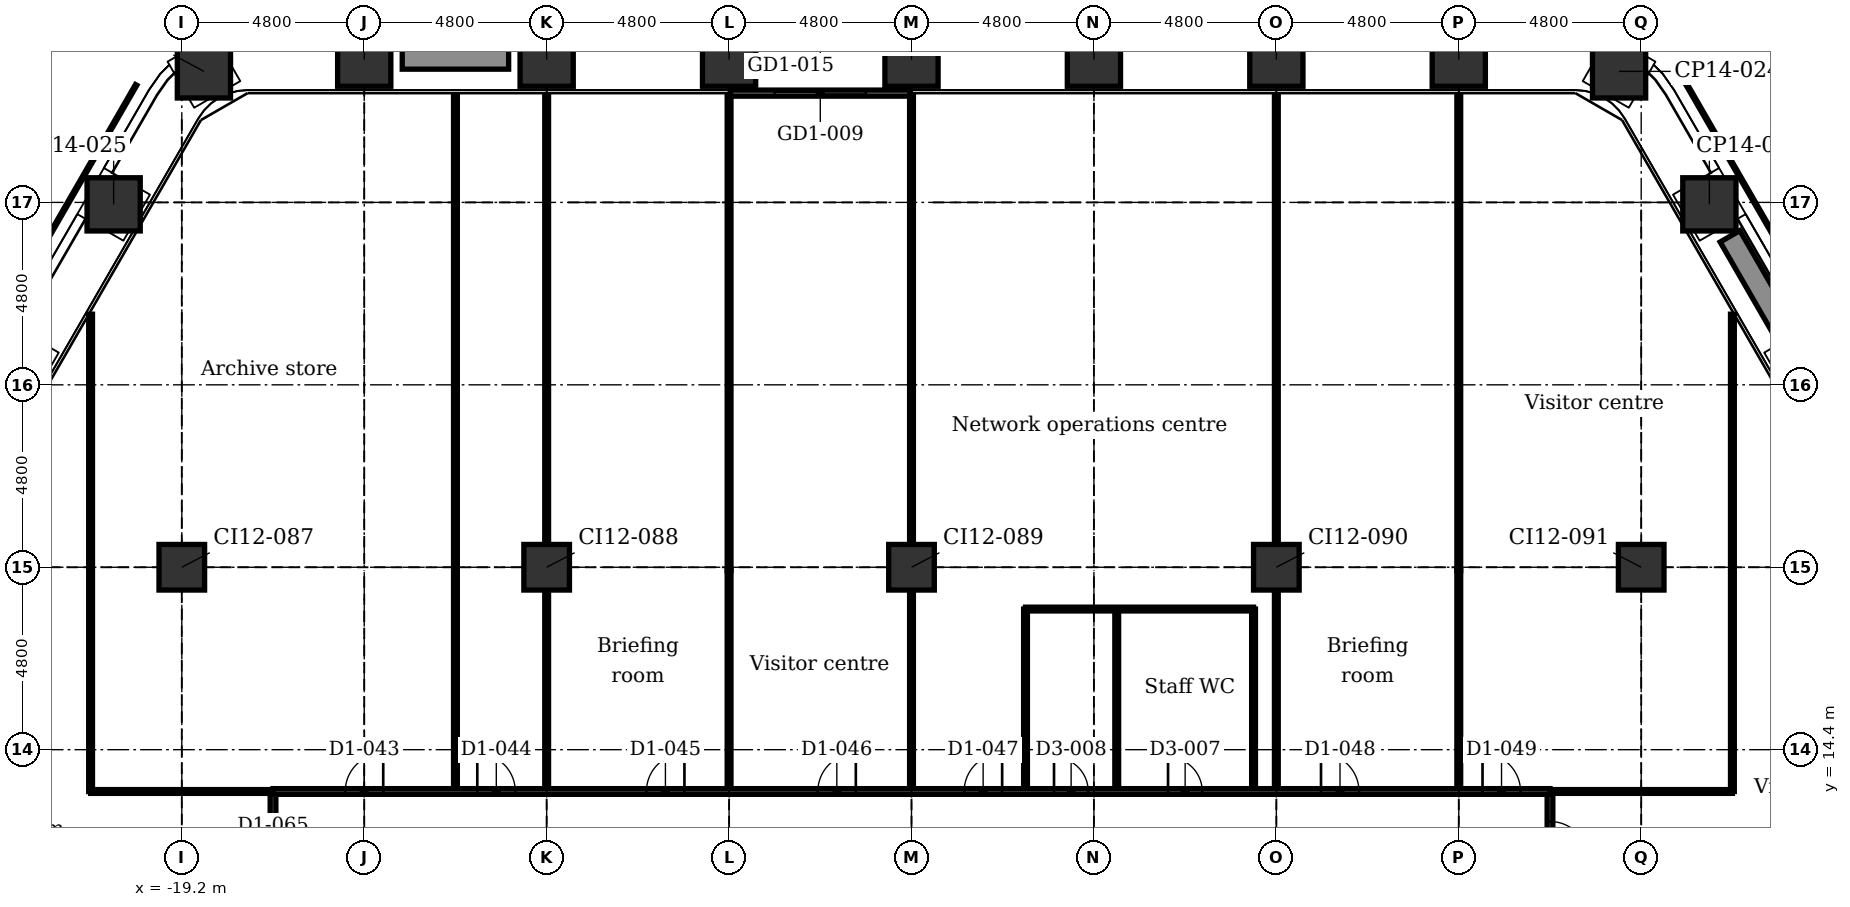
"""IFC4 building model, lengths in metres.
Left out: names, types, materials, properties, quantities, classifications, styles, units other than length and angle.
Written with IfcOpenShell. Run it as: python <this file> out.ifc"""

import sys

from ifc_helpers import new_model, si_unit, direction, frame, frame_2d, origin, origin_2d, place, context, subcontext, project, spatial, rectangle, extrude, element, fill, save


model = new_model("IFC4")
c1 = context("Model", 3, precision=1e-05, world=origin(), true_north=direction((0.0, 1.0)))
c2 = subcontext(c1, "Body", "Model", "MODEL_VIEW")
j1 = project(units=[si_unit("LENGTHUNIT", "METRE"), si_unit("PLANEANGLEUNIT", "RADIAN")], contexts=[c1])
p1 = place(None, origin())
s1 = spatial("IfcSite", under=j1, at=p1, CompositionType="ELEMENT")
p2 = place(p1, origin())
s2 = spatial("IfcBuilding", under=s1, at=p2, CompositionType="ELEMENT")
p3 = place(p2, frame((0.0, 0.0, 17.4)))
s3 = spatial("IfcBuildingStorey", under=s2, at=p3, CompositionType="ELEMENT", Elevation=17.4)
for number, where, z_axis, x_axis in (
    (1, (-18.618, 32.247, -0.25), (0.0, 0.0, 1.0), (0.866, 0.5, 0.0)),
    (2, (-14.4, 32.555, -0.25), (0.0, 0.0, 1.0), (1.0, 0.0, 0.0)),
    (3, (-9.6, 32.555, -0.25), (0.0, 0.0, 1.0), (1.0, 0.0, 0.0)),
    (4, (-4.8, 32.555, -0.25), (0.0, 0.0, 1.0), (1.0, 0.0, 0.0)),
    (5, (0.0, 32.555, -0.25), (0.0, 0.0, 1.0), (1.0, 0.0, 0.0)),
    (6, (4.8, 32.555, -0.25), (0.0, 0.0, 1.0), (1.0, 0.0, 0.0)),
    (7, (9.6, 32.555, -0.25), (0.0, 0.0, 1.0), (1.0, 0.0, 0.0)),
    (8, (14.4, 32.555, -0.25), (0.0, 0.0, 1.0), (1.0, 0.0, 0.0)),
    (9, (18.618, 32.247, -0.25), (0.0, 0.0, 1.0), (0.5, 0.866, 0.0)),
    (10, (20.994, 28.749, -0.25), (0.0, 0.0, 1.0), (0.866, 0.5, 0.0)),
    (11, (23.394, 24.592, -0.25), (0.0, 0.0, 1.0), (0.866, 0.5, 0.0)),
    (12, (-23.394, 24.592, -0.25), (0.0, 0.0, 1.0), (0.5, 0.866, 0.0)),
    (13, (-20.994, 28.749, -0.25), (0.0, 0.0, 1.0), (0.5, 0.866, 0.0)),
):
    element("IfcColumn", number, at=place(p3, frame(where, z_axis=z_axis, x_axis=x_axis)), inside=s3, PredefinedType="COLUMN", context=c2, shape_type="SweptSolid", body=[
        extrude(rectangle(XDim=1.4, YDim=1.4, at=origin_2d()), origin(), (0.0, 0.0, 1.0), 5.0),
    ])
for number, where, z_axis, x_axis in (
    (14, (-19.2, 19.2, -0.25), (0.0, 0.0, 1.0), (1.0, 0.0, 0.0)),
    (15, (-9.6, 19.2, -0.25), (0.0, 0.0, 1.0), (1.0, 0.0, 0.0)),
    (16, (0.0, 19.2, -0.25), (0.0, 0.0, 1.0), (1.0, 0.0, 0.0)),
    (17, (9.6, 19.2, -0.25), (0.0, 0.0, 1.0), (1.0, 0.0, 0.0)),
    (18, (19.2, 19.2, -0.25), (0.0, 0.0, 1.0), (1.0, 0.0, 0.0)),
):
    element("IfcColumn", number, at=place(p3, frame(where, z_axis=z_axis, x_axis=x_axis)), inside=s3, PredefinedType="COLUMN", context=c2, shape_type="SweptSolid", body=[
        extrude(rectangle(XDim=1.2, YDim=1.2, at=origin_2d()), origin(), (0.0, 0.0, 1.0), 5.0),
    ])
p4 = place(p3, frame((-4.77, 31.675, 0.0), z_axis=(0.0, 0.0, 1.0), x_axis=(1.0, 0.0, 0.0)))
e19 = element("IfcWall", 19, at=p4, inside=s3, PredefinedType="PARTITIONING", context=c2, shape_type="SweptSolid", body=[
    extrude(rectangle(XDim=4.74, YDim=0.16, at=frame_2d((2.37, 0.0))), origin(), (0.0, 0.0, 1.0), 4.75),
])
p5 = place(p4, frame((1.17, 0.0, 0.0)))
e20 = element("IfcOpeningElement", 20, at=p5, cuts=e19, PredefinedType="OPENING", context=c2, shape_type="SweptSolid", body=[
    extrude(rectangle(XDim=2.4, YDim=2.4, at=frame_2d((1.2, 1.2))), frame((0.0, 0.09, 0.0), z_axis=(0.0, -1.0, 0.0), x_axis=(1.0, 0.0, 0.0)), (0.0, 0.0, 1.0), 0.18),
])
for number, where, z_axis, x_axis in (
    (21, (-13.4, 32.605, 0.0), (0.0, 0.0, 1.0), (1.0, 0.0, 0.0)),
    (22, (21.537, 27.907, 0.0), (0.0, 0.0, 1.0), (0.5, -0.866, 0.0)),
):
    element("IfcWall", number, at=place(p3, frame(where, z_axis=z_axis, x_axis=x_axis)), inside=s3, PredefinedType="USERDEFINED", context=c2, shape_type="SweptSolid", body=[
        extrude(rectangle(XDim=2.8, YDim=0.6, at=frame_2d((1.4, 0.0))), origin(), (0.0, 0.0, 1.0), 0.7),
    ])
p6 = place(p3, frame((21.6, 13.3, 0.0), z_axis=(0.0, 0.0, 1.0), x_axis=(0.0, 1.0, 0.0)))
e23 = element("IfcWall", 23, at=p6, inside=s3, PredefinedType="PARTITIONING", context=c2, shape_type="SweptSolid", body=[
    extrude(rectangle(XDim=12.558, YDim=0.1, at=frame_2d((6.279, 0.0))), origin(), (0.0, 0.0, 1.0), 4.75),
])
p7 = place(p3, frame((16.8, 3.95, 0.0), z_axis=(0.0, 0.0, 1.0), x_axis=(0.0, 1.0, 0.0)))
e24 = element("IfcWall", 24, at=p7, inside=s3, PredefinedType="PARTITIONING", context=c2, shape_type="SweptSolid", body=[
    extrude(rectangle(XDim=9.35, YDim=0.15, at=frame_2d((4.675, 0.0))), origin(), (0.0, 0.0, 1.0), 4.75),
])
p8 = place(p7, frame((2.835, 0.0, 0.0)))
e25 = element("IfcOpeningElement", 25, at=p8, cuts=e24, PredefinedType="OPENING", context=c2, shape_type="SweptSolid", body=[
    extrude(rectangle(XDim=1.0, YDim=2.1, at=frame_2d((0.5, 1.05))), frame((0.0, 0.085, 0.0), z_axis=(0.0, -1.0, 0.0), x_axis=(1.0, 0.0, 0.0)), (0.0, 0.0, 1.0), 0.17),
])
p9 = place(p7, frame((7.56, 0.0, 0.0)))
e26 = element("IfcOpeningElement", 26, at=p9, cuts=e24, PredefinedType="OPENING", context=c2, shape_type="SweptSolid", body=[
    extrude(rectangle(XDim=1.0, YDim=2.1, at=frame_2d((0.5, 1.05))), frame((0.0, 0.085, 0.0), z_axis=(0.0, -1.0, 0.0), x_axis=(1.0, 0.0, 0.0)), (0.0, 0.0, 1.0), 0.17),
])
p10 = place(p3, frame((14.4, 19.113, 0.0), z_axis=(0.0, 0.0, 1.0), x_axis=(0.0, 1.0, 0.0)))
e27 = element("IfcWall", 27, at=p10, inside=s3, PredefinedType="PARTITIONING", context=c2, shape_type="SweptSolid", body=[
    extrude(rectangle(XDim=12.472, YDim=0.1, at=frame_2d((6.236, 0.0))), origin(), (0.0, 0.0, 1.0), 4.066),
])
p11 = place(p3, frame((14.4, 13.3, 0.0), z_axis=(0.0, 0.0, 1.0), x_axis=(0.0, 1.0, 0.0)))
e28 = element("IfcWall", 28, at=p11, inside=s3, PredefinedType="PARTITIONING", context=c2, shape_type="SweptSolid", body=[
    extrude(rectangle(XDim=5.813, YDim=0.1, at=frame_2d((2.906, 0.0))), origin(), (0.0, 0.0, 1.0), 4.293),
])
p12 = place(p3, frame((9.6, 13.3, 0.0), z_axis=(0.0, 0.0, 1.0), x_axis=(0.0, 1.0, 0.0)))
e29 = element("IfcWall", 29, at=p12, inside=s3, PredefinedType="PARTITIONING", context=c2, shape_type="SweptSolid", body=[
    extrude(rectangle(XDim=5.3, YDim=0.1, at=frame_2d((2.65, 0.0))), origin(), (0.0, 0.0, 1.0), 4.293),
])
p13 = place(p3, frame((9.6, 19.8, 0.0), z_axis=(0.0, 0.0, 1.0), x_axis=(0.0, 1.0, 0.0)))
e30 = element("IfcWall", 30, at=p13, inside=s3, PredefinedType="PARTITIONING", context=c2, shape_type="SweptSolid", body=[
    extrude(rectangle(XDim=11.785, YDim=0.1, at=frame_2d((5.893, 0.0))), origin(), (0.0, 0.0, 1.0), 4.142),
])
for number, where, z_axis, x_axis in (
    (31, (9.0, 13.3, 0.0), (0.0, 0.0, 1.0), (0.0, 1.0, 0.0)),
    (32, (5.4, 13.3, 0.0), (0.0, 0.0, 1.0), (0.0, 1.0, 0.0)),
    (33, (3.0, 13.3, 0.0), (0.0, 0.0, 1.0), (0.0, 1.0, 0.0)),
):
    element("IfcWall", number, at=place(p3, frame(where, z_axis=z_axis, x_axis=x_axis)), inside=s3, PredefinedType="PARTITIONING", context=c2, shape_type="SweptSolid", body=[
        extrude(rectangle(XDim=4.8, YDim=0.1, at=frame_2d((2.4, 0.0))), origin(), (0.0, 0.0, 1.0), 4.75),
    ])
p14 = place(p3, frame((0.0, 13.3, 0.0), z_axis=(0.0, 0.0, 1.0), x_axis=(0.0, 1.0, 0.0)))
e34 = element("IfcWall", 34, at=p14, inside=s3, PredefinedType="PARTITIONING", context=c2, shape_type="SweptSolid", body=[
    extrude(rectangle(XDim=5.3, YDim=0.1, at=frame_2d((2.65, 0.0))), origin(), (0.0, 0.0, 1.0), 4.293),
])
p15 = place(p3, frame((0.0, 19.8, 0.0), z_axis=(0.0, 0.0, 1.0), x_axis=(0.0, 1.0, 0.0)))
e35 = element("IfcWall", 35, at=p15, inside=s3, PredefinedType="PARTITIONING", context=c2, shape_type="SweptSolid", body=[
    extrude(rectangle(XDim=11.795, YDim=0.1, at=frame_2d((5.898, 0.0))), origin(), (0.0, 0.0, 1.0), 4.142),
])
p16 = place(p3, frame((-4.8, 19.113, 0.0), z_axis=(0.0, 0.0, 1.0), x_axis=(0.0, 1.0, 0.0)))
e36 = element("IfcWall", 36, at=p16, inside=s3, PredefinedType="PARTITIONING", context=c2, shape_type="SweptSolid", body=[
    extrude(rectangle(XDim=12.482, YDim=0.1, at=frame_2d((6.241, 0.0))), origin(), (0.0, 0.0, 1.0), 4.066),
])
p17 = place(p3, frame((-4.8, 13.3, 0.0), z_axis=(0.0, 0.0, 1.0), x_axis=(0.0, 1.0, 0.0)))
e37 = element("IfcWall", 37, at=p17, inside=s3, PredefinedType="PARTITIONING", context=c2, shape_type="SweptSolid", body=[
    extrude(rectangle(XDim=5.813, YDim=0.1, at=frame_2d((2.906, 0.0))), origin(), (0.0, 0.0, 1.0), 4.293),
])
p18 = place(p3, frame((-9.6, 13.3, 0.0), z_axis=(0.0, 0.0, 1.0), x_axis=(0.0, 1.0, 0.0)))
e38 = element("IfcWall", 38, at=p18, inside=s3, PredefinedType="PARTITIONING", context=c2, shape_type="SweptSolid", body=[
    extrude(rectangle(XDim=5.3, YDim=0.1, at=frame_2d((2.65, 0.0))), origin(), (0.0, 0.0, 1.0), 4.293),
])
p19 = place(p3, frame((-9.6, 19.8, 0.0), z_axis=(0.0, 0.0, 1.0), x_axis=(0.0, 1.0, 0.0)))
e39 = element("IfcWall", 39, at=p19, inside=s3, PredefinedType="PARTITIONING", context=c2, shape_type="SweptSolid", body=[
    extrude(rectangle(XDim=11.785, YDim=0.1, at=frame_2d((5.893, 0.0))), origin(), (0.0, 0.0, 1.0), 4.142),
])
p20 = place(p3, frame((-12.0, 13.3, 0.0), z_axis=(0.0, 0.0, 1.0), x_axis=(0.0, 1.0, 0.0)))
e40 = element("IfcWall", 40, at=p20, inside=s3, PredefinedType="PARTITIONING", context=c2, shape_type="SweptSolid", body=[
    extrude(rectangle(XDim=18.285, YDim=0.1, at=frame_2d((9.143, 0.0))), origin(), (0.0, 0.0, 1.0), 4.75),
])
p21 = place(p3, frame((-16.8, 3.95, 0.0), z_axis=(0.0, 0.0, 1.0), x_axis=(0.0, 1.0, 0.0)))
e41 = element("IfcWall", 41, at=p21, inside=s3, PredefinedType="PARTITIONING", context=c2, shape_type="SweptSolid", body=[
    extrude(rectangle(XDim=9.35, YDim=0.15, at=frame_2d((4.675, 0.0))), origin(), (0.0, 0.0, 1.0), 4.75),
])
p22 = place(p21, frame((0.95, 0.0, 0.0)))
e42 = element("IfcOpeningElement", 42, at=p22, cuts=e41, PredefinedType="OPENING", context=c2, shape_type="SweptSolid", body=[
    extrude(rectangle(XDim=1.0, YDim=2.1, at=frame_2d((0.5, 1.05))), frame((0.0, 0.085, 0.0), z_axis=(0.0, -1.0, 0.0), x_axis=(1.0, 0.0, 0.0)), (0.0, 0.0, 1.0), 0.17),
])
p23 = place(p21, frame((3.675, 0.0, 0.0)))
e43 = element("IfcOpeningElement", 43, at=p23, cuts=e41, PredefinedType="OPENING", context=c2, shape_type="SweptSolid", body=[
    extrude(rectangle(XDim=1.0, YDim=2.1, at=frame_2d((0.5, 1.05))), frame((0.0, 0.085, 0.0), z_axis=(0.0, -1.0, 0.0), x_axis=(1.0, 0.0, 0.0)), (0.0, 0.0, 1.0), 0.17),
])
p24 = place(p21, frame((6.85, 0.0, 0.0)))
e44 = element("IfcOpeningElement", 44, at=p24, cuts=e41, PredefinedType="OPENING", context=c2, shape_type="SweptSolid", body=[
    extrude(rectangle(XDim=1.0, YDim=2.1, at=frame_2d((0.5, 1.05))), frame((0.0, 0.085, 0.0), z_axis=(0.0, -1.0, 0.0), x_axis=(1.0, 0.0, 0.0)), (0.0, 0.0, 1.0), 0.17),
])
p25 = place(p3, frame((-21.6, 13.3, 0.0), z_axis=(0.0, 0.0, 1.0), x_axis=(0.0, 1.0, 0.0)))
e45 = element("IfcWall", 45, at=p25, inside=s3, PredefinedType="PARTITIONING", context=c2, shape_type="SweptSolid", body=[
    extrude(rectangle(XDim=12.558, YDim=0.1, at=frame_2d((6.279, 0.0))), origin(), (0.0, 0.0, 1.0), 4.75),
])
for number, where, z_axis, x_axis in (
    (46, (-21.6, 13.3, 0.0), (0.0, 0.0, 1.0), (1.0, 0.0, 0.0)),
    (47, (16.8, 13.3, 0.0), (0.0, 0.0, 1.0), (1.0, 0.0, 0.0)),
):
    element("IfcWall", number, at=place(p3, frame(where, z_axis=z_axis, x_axis=x_axis)), inside=s3, PredefinedType="PARTITIONING", context=c2, shape_type="SweptSolid", body=[
        extrude(rectangle(XDim=4.8, YDim=0.1, at=frame_2d((2.4, 0.0))), origin(), (0.0, 0.0, 1.0), 4.75),
    ])
p26 = place(p3, frame((-16.8, 13.3, 0.0), z_axis=(0.0, 0.0, 1.0), x_axis=(1.0, 0.0, 0.0)))
e48 = element("IfcWall", 48, at=p26, inside=s3, PredefinedType="PARTITIONING", context=c2, shape_type="SweptSolid", body=[
    extrude(rectangle(XDim=33.6, YDim=0.15, at=frame_2d((16.8, 0.0))), origin(), (0.0, 0.0, 1.0), 4.75),
])
p27 = place(p26, frame((1.9, 0.0, 0.0)))
e49 = element("IfcOpeningElement", 49, at=p27, cuts=e48, PredefinedType="OPENING", context=c2, shape_type="SweptSolid", body=[
    extrude(rectangle(XDim=1.0, YDim=2.1, at=frame_2d((0.5, 1.05))), frame((0.0, 0.085, 0.0), z_axis=(0.0, -1.0, 0.0), x_axis=(1.0, 0.0, 0.0)), (0.0, 0.0, 1.0), 0.17),
])
p28 = place(p26, frame((5.375, 0.0, 0.0)))
e50 = element("IfcOpeningElement", 50, at=p28, cuts=e48, PredefinedType="OPENING", context=c2, shape_type="SweptSolid", body=[
    extrude(rectangle(XDim=1.0, YDim=2.1, at=frame_2d((0.5, 1.05))), frame((0.0, 0.085, 0.0), z_axis=(0.0, -1.0, 0.0), x_axis=(1.0, 0.0, 0.0)), (0.0, 0.0, 1.0), 0.17),
])
p29 = place(p26, frame((9.825, 0.0, 0.0)))
e51 = element("IfcOpeningElement", 51, at=p29, cuts=e48, PredefinedType="OPENING", context=c2, shape_type="SweptSolid", body=[
    extrude(rectangle(XDim=1.0, YDim=2.1, at=frame_2d((0.5, 1.05))), frame((0.0, 0.085, 0.0), z_axis=(0.0, -1.0, 0.0), x_axis=(1.0, 0.0, 0.0)), (0.0, 0.0, 1.0), 0.17),
])
p30 = place(p26, frame((14.335, 0.0, 0.0)))
e52 = element("IfcOpeningElement", 52, at=p30, cuts=e48, PredefinedType="OPENING", context=c2, shape_type="SweptSolid", body=[
    extrude(rectangle(XDim=1.0, YDim=2.1, at=frame_2d((0.5, 1.05))), frame((0.0, 0.085, 0.0), z_axis=(0.0, -1.0, 0.0), x_axis=(1.0, 0.0, 0.0)), (0.0, 0.0, 1.0), 0.17),
])
p31 = place(p26, frame((18.185, 0.0, 0.0)))
e53 = element("IfcOpeningElement", 53, at=p31, cuts=e48, PredefinedType="OPENING", context=c2, shape_type="SweptSolid", body=[
    extrude(rectangle(XDim=1.0, YDim=2.1, at=frame_2d((0.5, 1.05))), frame((0.0, 0.085, 0.0), z_axis=(0.0, -1.0, 0.0), x_axis=(1.0, 0.0, 0.0)), (0.0, 0.0, 1.0), 0.17),
])
p32 = place(p26, frame((27.575, 0.0, 0.0)))
e54 = element("IfcOpeningElement", 54, at=p32, cuts=e48, PredefinedType="OPENING", context=c2, shape_type="SweptSolid", body=[
    extrude(rectangle(XDim=1.0, YDim=2.1, at=frame_2d((0.5, 1.05))), frame((0.0, 0.085, 0.0), z_axis=(0.0, -1.0, 0.0), x_axis=(1.0, 0.0, 0.0)), (0.0, 0.0, 1.0), 0.17),
])
p33 = place(p26, frame((31.825, 0.0, 0.0)))
e55 = element("IfcOpeningElement", 55, at=p33, cuts=e48, PredefinedType="OPENING", context=c2, shape_type="SweptSolid", body=[
    extrude(rectangle(XDim=1.0, YDim=2.1, at=frame_2d((0.5, 1.05))), frame((0.0, 0.085, 0.0), z_axis=(0.0, -1.0, 0.0), x_axis=(1.0, 0.0, 0.0)), (0.0, 0.0, 1.0), 0.17),
])
p34 = place(p26, frame((23.55, 0.0, 0.0)))
e56 = element("IfcOpeningElement", 56, at=p34, cuts=e48, PredefinedType="OPENING", context=c2, shape_type="SweptSolid", body=[
    extrude(rectangle(XDim=0.9, YDim=2.1, at=frame_2d((0.45, 1.05))), frame((0.0, 0.085, 0.0), z_axis=(0.0, -1.0, 0.0), x_axis=(1.0, 0.0, 0.0)), (0.0, 0.0, 1.0), 0.17),
])
p35 = place(p26, frame((20.55, 0.0, 0.0)))
e57 = element("IfcOpeningElement", 57, at=p35, cuts=e48, PredefinedType="OPENING", context=c2, shape_type="SweptSolid", body=[
    extrude(rectangle(XDim=0.9, YDim=2.1, at=frame_2d((0.45, 1.05))), frame((0.0, 0.085, 0.0), z_axis=(0.0, -1.0, 0.0), x_axis=(1.0, 0.0, 0.0)), (0.0, 0.0, 1.0), 0.17),
])
p36 = place(p3, frame((3.0, 18.1, 0.0), z_axis=(0.0, 0.0, 1.0), x_axis=(1.0, 0.0, 0.0)))
e58 = element("IfcWall", 58, at=p36, inside=s3, PredefinedType="PARTITIONING", context=c2, shape_type="SweptSolid", body=[
    extrude(rectangle(XDim=6.0, YDim=0.1, at=frame_2d((3.0, 0.0))), origin(), (0.0, 0.0, 1.0), 4.75),
])
p37 = place(p5, origin())
e59 = element("IfcDoor", 59, at=p37, inside=s3, OperationType="DOUBLE_DOOR_SLIDING", PredefinedType="DOOR", context=c2, shape_type="SweptSolid", body=[
    extrude(rectangle(XDim=2.4, YDim=2.4, at=frame_2d((1.2, 1.2))), frame((0.0, 0.025, 0.0), z_axis=(0.0, -1.0, 0.0), x_axis=(1.0, 0.0, 0.0)), (0.0, 0.0, 1.0), 0.05),
])
fill(e20, e59)
p38 = place(p27, origin())
e60 = element("IfcDoor", 60, at=p38, inside=s3, OperationType="SINGLE_SWING_RIGHT", PredefinedType="DOOR", context=c2, shape_type="SweptSolid", body=[
    extrude(rectangle(XDim=1.0, YDim=2.1, at=frame_2d((0.5, 1.05))), frame((0.0, 0.025, 0.0), z_axis=(0.0, -1.0, 0.0), x_axis=(1.0, 0.0, 0.0)), (0.0, 0.0, 1.0), 0.05),
])
fill(e49, e60)
p39 = place(p28, origin())
e61 = element("IfcDoor", 61, at=p39, inside=s3, OperationType="SINGLE_SWING_LEFT", PredefinedType="DOOR", context=c2, shape_type="SweptSolid", body=[
    extrude(rectangle(XDim=1.0, YDim=2.1, at=frame_2d((0.5, 1.05))), frame((0.0, 0.025, 0.0), z_axis=(0.0, -1.0, 0.0), x_axis=(1.0, 0.0, 0.0)), (0.0, 0.0, 1.0), 0.05),
])
fill(e50, e61)
p40 = place(p29, origin())
e62 = element("IfcDoor", 62, at=p40, inside=s3, OperationType="SINGLE_SWING_RIGHT", PredefinedType="DOOR", context=c2, shape_type="SweptSolid", body=[
    extrude(rectangle(XDim=1.0, YDim=2.1, at=frame_2d((0.5, 1.05))), frame((0.0, 0.025, 0.0), z_axis=(0.0, -1.0, 0.0), x_axis=(1.0, 0.0, 0.0)), (0.0, 0.0, 1.0), 0.05),
])
fill(e51, e62)
p41 = place(p30, origin())
e63 = element("IfcDoor", 63, at=p41, inside=s3, OperationType="SINGLE_SWING_RIGHT", PredefinedType="DOOR", context=c2, shape_type="SweptSolid", body=[
    extrude(rectangle(XDim=1.0, YDim=2.1, at=frame_2d((0.5, 1.05))), frame((0.0, 0.025, 0.0), z_axis=(0.0, -1.0, 0.0), x_axis=(1.0, 0.0, 0.0)), (0.0, 0.0, 1.0), 0.05),
])
fill(e52, e63)
p42 = place(p31, origin())
e64 = element("IfcDoor", 64, at=p42, inside=s3, OperationType="SINGLE_SWING_RIGHT", PredefinedType="DOOR", context=c2, shape_type="SweptSolid", body=[
    extrude(rectangle(XDim=1.0, YDim=2.1, at=frame_2d((0.5, 1.05))), frame((0.0, 0.025, 0.0), z_axis=(0.0, -1.0, 0.0), x_axis=(1.0, 0.0, 0.0)), (0.0, 0.0, 1.0), 0.05),
])
fill(e53, e64)
p43 = place(p32, origin())
e65 = element("IfcDoor", 65, at=p43, inside=s3, OperationType="SINGLE_SWING_LEFT", PredefinedType="DOOR", context=c2, shape_type="SweptSolid", body=[
    extrude(rectangle(XDim=1.0, YDim=2.1, at=frame_2d((0.5, 1.05))), frame((0.0, 0.025, 0.0), z_axis=(0.0, -1.0, 0.0), x_axis=(1.0, 0.0, 0.0)), (0.0, 0.0, 1.0), 0.05),
])
fill(e54, e65)
p44 = place(p33, origin())
e66 = element("IfcDoor", 66, at=p44, inside=s3, OperationType="SINGLE_SWING_LEFT", PredefinedType="DOOR", context=c2, shape_type="SweptSolid", body=[
    extrude(rectangle(XDim=1.0, YDim=2.1, at=frame_2d((0.5, 1.05))), frame((0.0, 0.025, 0.0), z_axis=(0.0, -1.0, 0.0), x_axis=(1.0, 0.0, 0.0)), (0.0, 0.0, 1.0), 0.05),
])
fill(e55, e66)
p45 = place(p9, frame((1.0, 0.0, 0.0), z_axis=(0.0, 0.0, 1.0), x_axis=(-1.0, 0.0, 0.0)))
e67 = element("IfcDoor", 67, at=p45, inside=s3, OperationType="SINGLE_SWING_LEFT", PredefinedType="DOOR", context=c2, shape_type="SweptSolid", body=[
    extrude(rectangle(XDim=1.0, YDim=2.1, at=frame_2d((0.5, 1.05))), frame((0.0, 0.025, 0.0), z_axis=(0.0, -1.0, 0.0), x_axis=(1.0, 0.0, 0.0)), (0.0, 0.0, 1.0), 0.05),
])
fill(e26, e67)
p46 = place(p34, origin())
e68 = element("IfcDoor", 68, at=p46, inside=s3, OperationType="SINGLE_SWING_LEFT", PredefinedType="DOOR", context=c2, shape_type="SweptSolid", body=[
    extrude(rectangle(XDim=0.9, YDim=2.1, at=frame_2d((0.45, 1.05))), frame((0.0, 0.025, 0.0), z_axis=(0.0, -1.0, 0.0), x_axis=(1.0, 0.0, 0.0)), (0.0, 0.0, 1.0), 0.05),
])
fill(e56, e68)
p47 = place(p35, origin())
e69 = element("IfcDoor", 69, at=p47, inside=s3, OperationType="SINGLE_SWING_LEFT", PredefinedType="DOOR", context=c2, shape_type="SweptSolid", body=[
    extrude(rectangle(XDim=0.9, YDim=2.1, at=frame_2d((0.45, 1.05))), frame((0.0, 0.025, 0.0), z_axis=(0.0, -1.0, 0.0), x_axis=(1.0, 0.0, 0.0)), (0.0, 0.0, 1.0), 0.05),
])
fill(e57, e69)
save(model, sys.argv[1])
